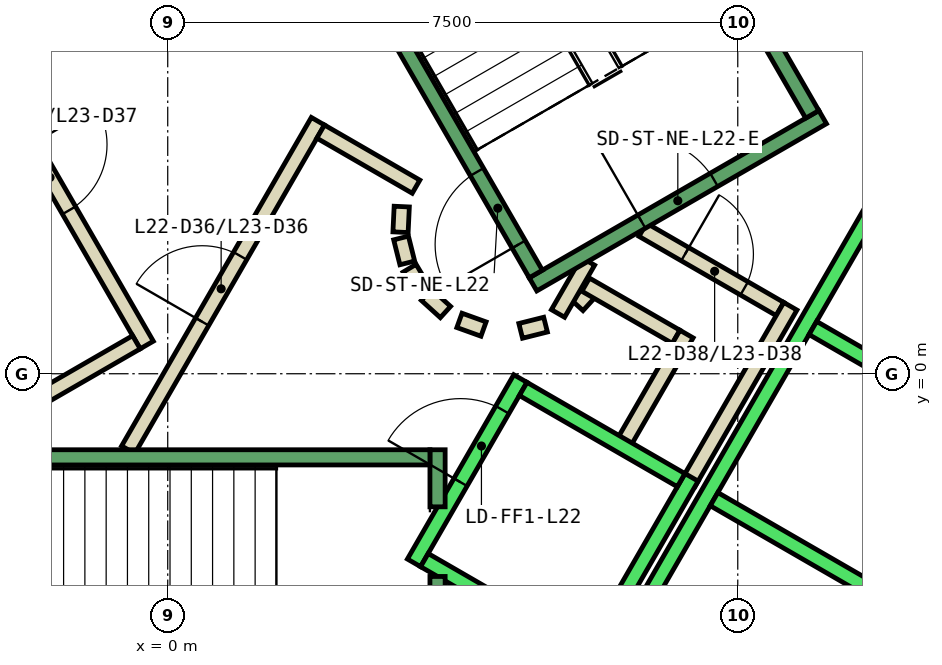
"""IFC4 building model, lengths in metres.
Left out: names, types, materials, properties, quantities, classifications, styles, units other than length and angle.
Written with IfcOpenShell. Run it as: python <this file> out.ifc"""

import sys

from ifc_helpers import new_model, si_unit, direction, frame, frame_2d, origin, place, context, subcontext, project, spatial, polyline, rectangle, outline, extrude, element, fill, save


model = new_model("IFC4")
c1 = context("Model", 3, precision=1e-05, world=origin(), true_north=direction((0.0, 1.0)))
c2 = subcontext(c1, "Body", "Model", "MODEL_VIEW")
j1 = project(units=[si_unit("LENGTHUNIT", "METRE"), si_unit("PLANEANGLEUNIT", "RADIAN")], contexts=[c1])
p1 = place(None, origin())
s1 = spatial("IfcSite", under=j1, at=p1, CompositionType="ELEMENT")
p2 = place(p1, origin())
s2 = spatial("IfcBuilding", under=s1, at=p2, CompositionType="ELEMENT")
p3 = place(p2, frame((0.0, 0.0, 103.4)))
s3 = spatial("IfcBuildingStorey", under=s2, at=p3, CompositionType="ELEMENT", Elevation=103.4)
p4 = place(p3, frame((0.0, 0.0, -0.4)))
e1 = element("IfcWall", 1, at=p4, inside=s3, PredefinedType="SHEAR", context=c2, shape_type="SweptSolid", body=[
    extrude(outline(polyline([(8.517, 11.748), (7.738, 11.298), (12.817, 2.5), (13.856, 2.5), (8.517, 11.748)])), origin(), (0.0, 0.0, 1.0), 4.2),
])
p5 = place(p3, frame((5.39, 0.898, 0.0), z_axis=(0.0, 0.0, 1.0), x_axis=(0.673828488714, 0.738887791073, 0.0)))
e2 = element("IfcWall", 2, at=p5, inside=s3, PredefinedType="PARTITIONING", context=c2, shape_type="SweptSolid", body=[
    extrude(rectangle(XDim=0.263, YDim=0.2, at=frame_2d((0.131, 0.0))), origin(), (0.0, 0.0, 1.0), 3.8),
])
p6 = place(p3, frame((5.499, 1.172, 0.0), z_axis=(0.0, 0.0, 1.0), x_axis=(0.866333505267, -0.499465972466, 0.0)))
e3 = element("IfcWall", 3, at=p6, inside=s3, PredefinedType="PARTITIONING", context=c2, shape_type="SweptSolid", body=[
    extrude(rectangle(XDim=1.374, YDim=0.2, at=frame_2d((0.687, 0.0))), origin(), (0.0, 0.0, 1.0), 3.8),
])
p7 = place(p3, frame((6.826, 0.522, 0.0), z_axis=(0.0, 0.0, 1.0), x_axis=(-0.500016722714, -0.866015748706, 0.0)))
e4 = element("IfcWall", 4, at=p7, inside=s3, PredefinedType="PARTITIONING", context=c2, shape_type="SweptSolid", body=[
    extrude(rectangle(XDim=1.7, YDim=0.2, at=frame_2d((0.85, 0.0))), origin(), (0.0, 0.0, 1.0), 3.8),
])
p8 = place(p3, frame((6.25, 1.894, 0.0), z_axis=(0.0, 0.0, 1.0), x_axis=(0.866043184279, -0.499969202016, 0.0)))
e5 = element("IfcWall", 5, at=p8, inside=s3, PredefinedType="PARTITIONING", context=c2, shape_type="SweptSolid", body=[
    extrude(rectangle(XDim=2.084, YDim=0.2, at=frame_2d((1.042, 0.0))), origin(), (0.0, 0.0, 1.0), 3.8),
])
p9 = place(p8, frame((0.642, 0.0, 0.0)))
e6 = element("IfcOpeningElement", 6, at=p9, cuts=e5, PredefinedType="OPENING", context=c2, shape_type="SweptSolid", body=[
    extrude(rectangle(XDim=0.9, YDim=2.1, at=frame_2d((0.45, 1.05))), frame((0.0, 0.11, 0.0), z_axis=(0.0, -1.0, 0.0), x_axis=(1.0, 0.0, 0.0)), (0.0, 0.0, 1.0), 0.22),
])
p10 = place(p3, frame((8.192, 0.888, 0.0), z_axis=(0.0, 0.0, 1.0), x_axis=(-0.499940625693, -0.866059680843, 0.0)))
e7 = element("IfcWall", 7, at=p10, inside=s3, PredefinedType="PARTITIONING", context=c2, shape_type="SweptSolid", body=[
    extrude(rectangle(XDim=2.68, YDim=0.2, at=frame_2d((1.34, 0.0))), origin(), (0.0, 0.0, 1.0), 3.8),
])
p11 = place(p3, frame((5.135, 0.793, 0.0), z_axis=(0.0, 0.0, 1.0), x_axis=(0.499526442893, 0.866298639529, 0.0)))
e8 = element("IfcWall", 8, at=p11, inside=s3, PredefinedType="PARTITIONING", context=c2, shape_type="SweptSolid", body=[
    extrude(rectangle(XDim=0.791, YDim=0.2, at=frame_2d((0.396, 0.0))), origin(), (0.0, 0.0, 1.0), 3.8),
])
p12 = place(p3, frame((-0.52, -1.0, 0.0), z_axis=(0.0, 0.0, 1.0), x_axis=(0.50011622646, 0.865958290007, 0.0)))
e9 = element("IfcWall", 9, at=p12, inside=s3, PredefinedType="PARTITIONING", context=c2, shape_type="SweptSolid", body=[
    extrude(rectangle(XDim=4.991, YDim=0.2, at=frame_2d((2.496, 0.0))), origin(), (0.0, 0.0, 1.0), 3.8),
])
p13 = place(p12, frame((1.945, 0.0, 0.0)))
e10 = element("IfcOpeningElement", 10, at=p13, cuts=e9, PredefinedType="OPENING", context=c2, shape_type="SweptSolid", body=[
    extrude(rectangle(XDim=1.0, YDim=2.1, at=frame_2d((0.5, 1.05))), frame((0.0, 0.11, 0.0), z_axis=(0.0, -1.0, 0.0), x_axis=(1.0, 0.0, 0.0)), (0.0, 0.0, 1.0), 0.22),
])
p14 = place(p3, frame((2.012, 3.186, 0.0), z_axis=(0.0, 0.0, 1.0), x_axis=(0.865891012941, -0.500232699559, 0.0)))
e11 = element("IfcWall", 11, at=p14, inside=s3, PredefinedType="PARTITIONING", context=c2, shape_type="SweptSolid", body=[
    extrude(rectangle(XDim=1.449, YDim=0.2, at=frame_2d((0.725, 0.0))), origin(), (0.0, 0.0, 1.0), 3.8),
])
p15 = place(p3, frame((3.079, 2.199, 0.0), z_axis=(0.0, 0.0, 1.0), x_axis=(-0.047771483479, -0.998858290933, 0.0)))
e12 = element("IfcWall", 12, at=p15, inside=s3, PredefinedType="PARTITIONING", context=c2, shape_type="SweptSolid", body=[
    extrude(rectangle(XDim=0.337, YDim=0.2, at=frame_2d((0.169, 0.0))), origin(), (0.0, 0.0, 1.0), 3.8),
])
p16 = place(p3, frame((3.07, 1.786, 0.0), z_axis=(0.0, 0.0, 1.0), x_axis=(0.242705583207, -0.970099994784, 0.0)))
e13 = element("IfcWall", 13, at=p16, inside=s3, PredefinedType="PARTITIONING", context=c2, shape_type="SweptSolid", body=[
    extrude(rectangle(XDim=0.338, YDim=0.2, at=frame_2d((0.169, 0.0))), origin(), (0.0, 0.0, 1.0), 3.8),
])
for number, where, z_axis, x_axis in (
    (14, (3.182, 1.388, 0.0), (0.0, 0.0, 1.0), (0.512, -0.859, 0.0)),
    (15, (3.404, 1.039, 0.0), (0.0, 0.0, 1.0), (0.74, -0.672, 0.0)),
):
    element("IfcWall", number, at=place(p3, frame(where, z_axis=z_axis, x_axis=x_axis)), inside=s3, PredefinedType="PARTITIONING", context=c2, shape_type="SweptSolid", body=[
        extrude(rectangle(XDim=0.338, YDim=0.2, at=frame_2d((0.169, 0.0))), origin(), (0.0, 0.0, 1.0), 3.8),
    ])
p17 = place(p3, frame((3.838, 0.702, 0.0), z_axis=(0.0, 0.0, 1.0), x_axis=(0.941035081519, -0.338308993895, 0.0)))
e16 = element("IfcWall", 16, at=p17, inside=s3, PredefinedType="PARTITIONING", context=c2, shape_type="SweptSolid", body=[
    extrude(rectangle(XDim=0.337, YDim=0.2, at=frame_2d((0.168, 0.0))), origin(), (0.0, 0.0, 1.0), 3.8),
])
p18 = place(p3, frame((4.644, 0.564, 0.0), z_axis=(0.0, 0.0, 1.0), x_axis=(0.969929076366, 0.243387729394, 0.0)))
e17 = element("IfcWall", 17, at=p18, inside=s3, PredefinedType="PARTITIONING", context=c2, shape_type="SweptSolid", body=[
    extrude(rectangle(XDim=0.337, YDim=0.2, at=frame_2d((0.168, 0.0))), origin(), (0.0, 0.0, 1.0), 3.8),
])
p19 = place(p3, frame((-2.771, 4.7, 0.0), z_axis=(0.0, 0.0, 1.0), x_axis=(0.499969479948, -0.866043023828, 0.0)))
e18 = element("IfcWall", 18, at=p19, inside=s3, PredefinedType="PARTITIONING", context=c2, shape_type="SweptSolid", body=[
    extrude(rectangle(XDim=4.99, YDim=0.2, at=frame_2d((2.495, 0.0))), origin(), (0.0, 0.0, 1.0), 3.8),
])
p20 = place(p19, frame((1.945, 0.0, 0.0)))
e19 = element("IfcOpeningElement", 19, at=p20, cuts=e18, PredefinedType="OPENING", context=c2, shape_type="SweptSolid", body=[
    extrude(rectangle(XDim=1.0, YDim=2.1, at=frame_2d((0.5, 1.05))), frame((0.0, 0.11, 0.0), z_axis=(0.0, -1.0, 0.0), x_axis=(1.0, 0.0, 0.0)), (0.0, 0.0, 1.0), 0.22),
])
p21 = place(p3, frame((-0.412, 0.414, 0.0), z_axis=(0.0, 0.0, 1.0), x_axis=(-0.866017369001, -0.500013916395, 0.0)))
e20 = element("IfcWall", 20, at=p21, inside=s3, PredefinedType="PARTITIONING", context=c2, shape_type="SweptSolid", body=[
    extrude(rectangle(XDim=1.45, YDim=0.2, at=frame_2d((0.725, 0.0))), origin(), (0.0, 0.0, 1.0), 3.8),
])
p22 = place(p3, frame((3.24, -2.488, 0.0), z_axis=(0.0, 0.0, 1.0), x_axis=(0.49994636267, 0.866056369097, 0.0)))
e21 = element("IfcWall", 21, at=p22, inside=s3, PredefinedType="STANDARD", context=c2, shape_type="SweptSolid", body=[
    extrude(rectangle(XDim=2.8, YDim=0.2, at=frame_2d((1.4, 0.0))), origin(), (0.0, 0.0, 1.0), 3.8),
])
p23 = place(p22, frame((1.225, 0.0, 0.0)))
e22 = element("IfcOpeningElement", 22, at=p23, cuts=e21, PredefinedType="OPENING", context=c2, shape_type="SweptSolid", body=[
    extrude(rectangle(XDim=1.1, YDim=2.1, at=frame_2d((0.55, 1.05))), frame((0.0, 0.11, 0.0), z_axis=(0.0, -1.0, 0.0), x_axis=(1.0, 0.0, 0.0)), (0.0, 0.0, 1.0), 0.22),
])
p24 = place(p3, frame((5.492, -3.788, 0.0), z_axis=(0.0, 0.0, 1.0), x_axis=(0.500011755427, 0.866018616679, 0.0)))
e23 = element("IfcWall", 23, at=p24, inside=s3, PredefinedType="STANDARD", context=c2, shape_type="SweptSolid", body=[
    extrude(rectangle(XDim=2.8, YDim=0.2, at=frame_2d((1.4, 0.0))), origin(), (0.0, 0.0, 1.0), 3.8),
])
p25 = place(p3, frame((3.377, -2.452, 0.0), z_axis=(0.0, 0.0, 1.0), x_axis=(0.865955154139, -0.50012165622, 0.0)))
e24 = element("IfcWall", 24, at=p25, inside=s3, PredefinedType="STANDARD", context=c2, shape_type="SweptSolid", body=[
    extrude(rectangle(XDim=2.4, YDim=0.2, at=frame_2d((1.2, 0.0))), origin(), (0.0, 0.0, 1.0), 3.8),
])
p26 = place(p3, frame((4.677, -0.2, 0.0), z_axis=(0.0, 0.0, 1.0), x_axis=(0.865973769406, -0.500089422704, 0.0)))
e25 = element("IfcWall", 25, at=p26, inside=s3, PredefinedType="STANDARD", context=c2, shape_type="SweptSolid", body=[
    extrude(rectangle(XDim=2.399, YDim=0.2, at=frame_2d((1.2, 0.0))), origin(), (0.0, 0.0, 1.0), 3.8),
])
p27 = place(p3, frame((4.451, -6.19, 0.0), z_axis=(0.0, 0.0, 1.0), x_axis=(0.50000090737, 0.866024879913, 0.0)))
e26 = element("IfcWall", 26, at=p27, inside=s3, PredefinedType="STANDARD", context=c2, shape_type="SweptSolid", body=[
    extrude(rectangle(XDim=10.6, YDim=0.2, at=frame_2d((5.3, 0.0))), origin(), (0.0, 0.0, 1.0), 3.8),
])
for number, where, z_axis, x_axis in (
    (27, (7.188, -1.65, 0.0), (0.0, 0.0, 1.0), (0.866, -0.5, 0.0)),
    (28, (8.488, 0.602, 0.0), (0.0, 0.0, 1.0), (0.866, -0.5, 0.0)),
):
    element("IfcWall", number, at=place(p3, frame(where, z_axis=z_axis, x_axis=x_axis)), inside=s3, PredefinedType="STANDARD", context=c2, shape_type="SweptSolid", body=[
        extrude(rectangle(XDim=2.5, YDim=0.2, at=frame_2d((1.25, 0.0))), origin(), (0.0, 0.0, 1.0), 3.8),
    ])
p28 = place(p3, frame((3.55, -2.667, 0.0), z_axis=(0.0, 0.0, 1.0), x_axis=(0.0, -1.0, 0.0)))
e29 = element("IfcWall", 29, at=p28, inside=s3, PredefinedType="STANDARD", context=c2, shape_type="SweptSolid", body=[
    extrude(rectangle(XDim=2.733, YDim=0.2, at=frame_2d((1.366, 0.0))), origin(), (0.0, 0.0, 1.0), 3.8),
])
p29 = place(p3, frame((3.55, -1.0, 0.0), z_axis=(0.0, 0.0, 1.0), x_axis=(0.0, -1.0, 0.0)))
e30 = element("IfcWall", 30, at=p29, inside=s3, PredefinedType="STANDARD", context=c2, shape_type="SweptSolid", body=[
    extrude(rectangle(XDim=0.751, YDim=0.2, at=frame_2d((0.375, 0.0))), origin(), (0.0, 0.0, 1.0), 3.8),
])
p30 = place(p3, frame((-3.45, -1.1, 0.0), z_axis=(0.0, 0.0, 1.0), x_axis=(1.0, 0.0, 0.0)))
e31 = element("IfcWall", 31, at=p30, inside=s3, PredefinedType="STANDARD", context=c2, shape_type="SweptSolid", body=[
    extrude(rectangle(XDim=6.9, YDim=0.2, at=frame_2d((3.45, 0.0))), origin(), (0.0, 0.0, 1.0), 3.8),
])
p31 = place(p30, frame((0.45, 0.0, 0.0)))
e32 = element("IfcOpeningElement", 32, at=p31, cuts=e31, PredefinedType="OPENING", context=c2, shape_type="SweptSolid", body=[
    extrude(rectangle(XDim=1.1, YDim=2.2, at=frame_2d((0.55, 1.1))), frame((0.0, 0.11, 0.0), z_axis=(0.0, -1.0, 0.0), x_axis=(1.0, 0.0, 0.0)), (0.0, 0.0, 1.0), 0.22),
])
p32 = place(p3, frame((4.806, 1.176, 0.0), z_axis=(0.0, 0.0, 1.0), x_axis=(0.866059941101, 0.499940174841, 0.0)))
e33 = element("IfcWall", 33, at=p32, inside=s3, PredefinedType="STANDARD", context=c2, shape_type="SweptSolid", body=[
    extrude(rectangle(XDim=4.4, YDim=0.2, at=frame_2d((2.2, 0.0))), origin(), (0.0, 0.0, 1.0), 3.8),
])
p33 = place(p32, frame((1.65, 0.0, 0.0)))
e34 = element("IfcOpeningElement", 34, at=p33, cuts=e33, PredefinedType="OPENING", context=c2, shape_type="SweptSolid", body=[
    extrude(rectangle(XDim=1.1, YDim=2.2, at=frame_2d((0.55, 1.1))), frame((0.0, 0.11, 0.0), z_axis=(0.0, -1.0, 0.0), x_axis=(1.0, 0.0, 0.0)), (0.0, 0.0, 1.0), 0.22),
])
p34 = place(p3, frame((4.843, 1.312, 0.0), z_axis=(0.0, 0.0, 1.0), x_axis=(-0.499963383562, 0.866046543262, 0.0)))
e35 = element("IfcWall", 35, at=p34, inside=s3, PredefinedType="STANDARD", context=c2, shape_type="SweptSolid", body=[
    extrude(rectangle(XDim=6.9, YDim=0.2, at=frame_2d((3.45, 0.0))), origin(), (0.0, 0.0, 1.0), 3.8),
])
p35 = place(p34, frame((0.45, 0.0, 0.0)))
e36 = element("IfcOpeningElement", 36, at=p35, cuts=e35, PredefinedType="OPENING", context=c2, shape_type="SweptSolid", body=[
    extrude(rectangle(XDim=1.1, YDim=2.2, at=frame_2d((0.55, 1.1))), frame((0.0, 0.11, 0.0), z_axis=(0.0, -1.0, 0.0), x_axis=(1.0, 0.0, 0.0)), (0.0, 0.0, 1.0), 0.22),
])
p36 = place(p3, frame((8.48, 3.412, 0.0), z_axis=(0.0, 0.0, 1.0), x_axis=(-0.499978703459, 0.866037698999, 0.0)))
e37 = element("IfcWall", 37, at=p36, inside=s3, PredefinedType="STANDARD", context=c2, shape_type="SweptSolid", body=[
    extrude(rectangle(XDim=6.9, YDim=0.2, at=frame_2d((3.45, 0.0))), origin(), (0.0, 0.0, 1.0), 3.8),
])
p37 = place(p3, frame((-1.393, 7.288, 0.0), z_axis=(0.0, 0.0, 1.0), x_axis=(-0.499963383562, -0.866046543262, 0.0)))
e38 = element("IfcWall", 38, at=p37, inside=s3, PredefinedType="STANDARD", context=c2, shape_type="SweptSolid", body=[
    extrude(rectangle(XDim=6.9, YDim=0.2, at=frame_2d((3.45, 0.0))), origin(), (0.0, 0.0, 1.0), 3.8),
])
p38 = place(p37, frame((0.45, 0.0, 0.0)))
e39 = element("IfcOpeningElement", 39, at=p38, cuts=e38, PredefinedType="OPENING", context=c2, shape_type="SweptSolid", body=[
    extrude(rectangle(XDim=1.1, YDim=2.2, at=frame_2d((0.55, 1.1))), frame((0.0, 0.11, 0.0), z_axis=(0.0, -1.0, 0.0), x_axis=(1.0, 0.0, 0.0)), (0.0, 0.0, 1.0), 0.22),
])
p39 = place(p13, origin())
e40 = element("IfcDoor", 40, at=p39, inside=s3, OperationType="SINGLE_SWING_LEFT", PredefinedType="DOOR", context=c2, shape_type="SweptSolid", body=[
    extrude(rectangle(XDim=1.0, YDim=2.1, at=frame_2d((0.5, 1.05))), frame((0.0, 0.025, 0.0), z_axis=(0.0, -1.0, 0.0), x_axis=(1.0, 0.0, 0.0)), (0.0, 0.0, 1.0), 0.05),
])
fill(e10, e40)
p40 = place(p20, origin())
e41 = element("IfcDoor", 41, at=p40, inside=s3, OperationType="SINGLE_SWING_RIGHT", PredefinedType="DOOR", context=c2, shape_type="SweptSolid", body=[
    extrude(rectangle(XDim=1.0, YDim=2.1, at=frame_2d((0.5, 1.05))), frame((0.0, 0.025, 0.0), z_axis=(0.0, -1.0, 0.0), x_axis=(1.0, 0.0, 0.0)), (0.0, 0.0, 1.0), 0.05),
])
fill(e19, e41)
p41 = place(p9, origin())
e42 = element("IfcDoor", 42, at=p41, inside=s3, OperationType="SINGLE_SWING_LEFT", PredefinedType="DOOR", context=c2, shape_type="SweptSolid", body=[
    extrude(rectangle(XDim=0.9, YDim=2.1, at=frame_2d((0.45, 1.05))), frame((0.0, 0.025, 0.0), z_axis=(0.0, -1.0, 0.0), x_axis=(1.0, 0.0, 0.0)), (0.0, 0.0, 1.0), 0.05),
])
fill(e6, e42)
p42 = place(p23, origin())
e43 = element("IfcDoor", 43, at=p42, inside=s3, OperationType="SLIDING_TO_LEFT", PredefinedType="DOOR", context=c2, shape_type="SweptSolid", body=[
    extrude(rectangle(XDim=1.1, YDim=2.1, at=frame_2d((0.55, 1.05))), frame((0.0, 0.025, 0.0), z_axis=(0.0, -1.0, 0.0), x_axis=(1.0, 0.0, 0.0)), (0.0, 0.0, 1.0), 0.05),
])
fill(e22, e43)
p43 = place(p35, origin())
e44 = element("IfcDoor", 44, at=p43, inside=s3, OperationType="SINGLE_SWING_LEFT", PredefinedType="DOOR", context=c2, shape_type="SweptSolid", body=[
    extrude(rectangle(XDim=1.1, YDim=2.2, at=frame_2d((0.55, 1.1))), frame((0.0, 0.025, 0.0), z_axis=(0.0, -1.0, 0.0), x_axis=(1.0, 0.0, 0.0)), (0.0, 0.0, 1.0), 0.05),
])
fill(e36, e44)
p44 = place(p33, origin())
e45 = element("IfcDoor", 45, at=p44, inside=s3, OperationType="SINGLE_SWING_LEFT", PredefinedType="DOOR", context=c2, shape_type="SweptSolid", body=[
    extrude(rectangle(XDim=1.1, YDim=2.2, at=frame_2d((0.55, 1.1))), frame((0.0, 0.025, 0.0), z_axis=(0.0, -1.0, 0.0), x_axis=(1.0, 0.0, 0.0)), (0.0, 0.0, 1.0), 0.05),
])
fill(e34, e45)
save(model, sys.argv[1])
